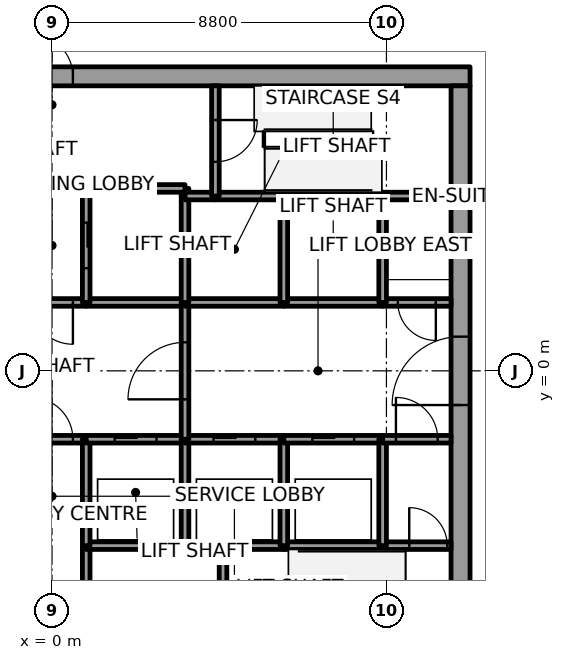
"""IFC4 building model, lengths in metres.
Left out: names, types, materials, properties, quantities, classifications, styles, units other than length and angle.
Written with IfcOpenShell. Run it as: python <this file> out.ifc"""

import sys

from ifc_helpers import new_model, si_unit, direction, frame, frame_2d, origin, place, context, subcontext, project, spatial, rectangle, extrude, element, fill, save


model = new_model("IFC4")
c1 = context("Model", 3, precision=1e-05, world=origin(), true_north=direction((0.0, 1.0)))
c2 = subcontext(c1, "Body", "Model", "MODEL_VIEW")
j1 = project(units=[si_unit("LENGTHUNIT", "METRE"), si_unit("PLANEANGLEUNIT", "RADIAN")], contexts=[c1])
p1 = place(None, origin())
s1 = spatial("IfcSite", under=j1, at=p1, CompositionType="ELEMENT")
p2 = place(p1, origin())
s2 = spatial("IfcBuilding", under=s1, at=p2, CompositionType="ELEMENT")
p3 = place(p2, frame((0.0, 0.0, 103.5)))
s3 = spatial("IfcBuildingStorey", under=s2, at=p3, CompositionType="ELEMENT", Elevation=103.5)
p4 = place(p3, frame((-11.0, 7.75, 0.0), z_axis=(0.0, 0.0, 1.0), x_axis=(1.0, 0.0, 0.0)))
e1 = element("IfcWall", 1, at=p4, inside=s3, PredefinedType="SHEAR", context=c2, shape_type="SweptSolid", body=[
    extrude(rectangle(XDim=22.0, YDim=0.5, at=frame_2d((11.0, 0.0))), origin(), (0.0, 0.0, 1.0), 3.7),
])
p5 = place(p4, frame((10.45, 0.0, 0.0)))
e2 = element("IfcOpeningElement", 2, at=p5, cuts=e1, PredefinedType="OPENING", context=c2, shape_type="SweptSolid", body=[
    extrude(rectangle(XDim=1.1, YDim=2.1, at=frame_2d((0.55, 1.05))), frame((0.0, 0.25, 0.0), z_axis=(0.0, -1.0, 0.0), x_axis=(1.0, 0.0, 0.0)), (0.0, 0.0, 1.0), 0.5),
])
p6 = place(p3, frame((10.75, -7.5, 0.0), z_axis=(0.0, 0.0, 1.0), x_axis=(0.0, 1.0, 0.0)))
e3 = element("IfcWall", 3, at=p6, inside=s3, PredefinedType="SHEAR", context=c2, shape_type="SweptSolid", body=[
    extrude(rectangle(XDim=15.0, YDim=0.5, at=frame_2d((7.5, 0.0))), origin(), (0.0, 0.0, 1.0), 3.7),
])
p7 = place(p6, frame((6.6, 0.0, 0.0)))
e4 = element("IfcOpeningElement", 4, at=p7, cuts=e3, PredefinedType="OPENING", context=c2, shape_type="SweptSolid", body=[
    extrude(rectangle(XDim=1.8, YDim=2.1, at=frame_2d((0.9, 1.05))), frame((0.0, 0.25, 0.0), z_axis=(0.0, -1.0, 0.0), x_axis=(1.0, 0.0, 0.0)), (0.0, 0.0, 1.0), 0.5),
])
p8 = place(p3, frame((-0.9, -1.8, 0.0), z_axis=(0.0, 0.0, 1.0), x_axis=(1.0, 0.0, 0.0)))
e5 = element("IfcWall", 5, at=p8, inside=s3, PredefinedType="SOLIDWALL", context=c2, shape_type="SweptSolid", body=[
    extrude(rectangle(XDim=1.8, YDim=0.2, at=frame_2d((0.9, 0.0))), origin(), (0.0, 0.0, 1.0), 3.55),
])
p9 = place(p8, frame((0.35, 0.0, 0.0)))
e6 = element("IfcOpeningElement", 6, at=p9, cuts=e5, PredefinedType="OPENING", context=c2, shape_type="SweptSolid", body=[
    extrude(rectangle(XDim=1.1, YDim=2.1, at=frame_2d((0.55, 1.05))), frame((0.0, 0.1, 0.0), z_axis=(0.0, -1.0, 0.0), x_axis=(1.0, 0.0, 0.0)), (0.0, 0.0, 1.0), 0.2),
])
p10 = place(p3, frame((0.9, 1.8, 0.0), z_axis=(0.0, 0.0, 1.0), x_axis=(-1.0, 0.0, 0.0)))
e7 = element("IfcWall", 7, at=p10, inside=s3, PredefinedType="SOLIDWALL", context=c2, shape_type="SweptSolid", body=[
    extrude(rectangle(XDim=1.8, YDim=0.2, at=frame_2d((0.9, 0.0))), origin(), (0.0, 0.0, 1.0), 3.55),
])
p11 = place(p10, frame((0.35, 0.0, 0.0)))
e8 = element("IfcOpeningElement", 8, at=p11, cuts=e7, PredefinedType="OPENING", context=c2, shape_type="SweptSolid", body=[
    extrude(rectangle(XDim=1.1, YDim=2.1, at=frame_2d((0.55, 1.05))), frame((0.0, 0.1, 0.0), z_axis=(0.0, -1.0, 0.0), x_axis=(1.0, 0.0, 0.0)), (0.0, 0.0, 1.0), 0.2),
])
p12 = place(p3, frame((0.9, -4.6, 0.0), z_axis=(0.0, 0.0, 1.0), x_axis=(0.0, -1.0, 0.0)))
e9 = element("IfcWall", 9, at=p12, inside=s3, PredefinedType="SOLIDWALL", context=c2, shape_type="SweptSolid", body=[
    extrude(rectangle(XDim=2.9, YDim=0.2, at=frame_2d((1.45, 0.0))), origin(), (0.0, 0.0, 1.0), 3.55),
])
p13 = place(p12, frame((1.0, 0.0, 0.0)))
e10 = element("IfcOpeningElement", 10, at=p13, cuts=e9, PredefinedType="OPENING", context=c2, shape_type="SweptSolid", body=[
    extrude(rectangle(XDim=0.9, YDim=2.1, at=frame_2d((0.45, 1.05))), frame((0.0, 0.1, 0.0), z_axis=(0.0, -1.0, 0.0), x_axis=(1.0, 0.0, 0.0)), (0.0, 0.0, 1.0), 0.2),
])
p14 = place(p3, frame((3.5, -4.6, 0.0), z_axis=(0.0, 0.0, 1.0), x_axis=(-1.0, 0.0, 0.0)))
e11 = element("IfcWall", 11, at=p14, inside=s3, PredefinedType="SOLIDWALL", context=c2, shape_type="SweptSolid", body=[
    extrude(rectangle(XDim=2.6, YDim=0.2, at=frame_2d((1.3, 0.0))), origin(), (0.0, 0.0, 1.0), 3.55),
])
p15 = place(p3, frame((0.9, -1.8, 0.0), z_axis=(0.0, 0.0, 1.0), x_axis=(0.0, -1.0, 0.0)))
e12 = element("IfcWall", 12, at=p15, inside=s3, PredefinedType="SOLIDWALL", context=c2, shape_type="SweptSolid", body=[
    extrude(rectangle(XDim=2.8, YDim=0.2, at=frame_2d((1.4, 0.0))), origin(), (0.0, 0.0, 1.0), 3.55),
])
p16 = place(p3, frame((0.9, -1.8, 0.0), z_axis=(0.0, 0.0, 1.0), x_axis=(1.0, 0.0, 0.0)))
e13 = element("IfcWall", 13, at=p16, inside=s3, PredefinedType="SOLIDWALL", context=c2, shape_type="SweptSolid", body=[
    extrude(rectangle(XDim=2.6, YDim=0.2, at=frame_2d((1.3, 0.0))), origin(), (0.0, 0.0, 1.0), 3.55),
])
p17 = place(p16, frame((0.75, 0.0, 0.0)))
e14 = element("IfcOpeningElement", 14, at=p17, cuts=e13, PredefinedType="OPENING", context=c2, shape_type="SweptSolid", body=[
    extrude(rectangle(XDim=1.1, YDim=2.1, at=frame_2d((0.55, 1.05))), frame((0.0, 0.1, 0.0), z_axis=(0.0, -1.0, 0.0), x_axis=(1.0, 0.0, 0.0)), (0.0, 0.0, 1.0), 0.2),
])
p18 = place(p3, frame((3.5, 1.8, 0.0), z_axis=(0.0, 0.0, 1.0), x_axis=(-1.0, 0.0, 0.0)))
e15 = element("IfcWall", 15, at=p18, inside=s3, PredefinedType="SOLIDWALL", context=c2, shape_type="SweptSolid", body=[
    extrude(rectangle(XDim=2.6, YDim=0.2, at=frame_2d((1.3, 0.0))), origin(), (0.0, 0.0, 1.0), 3.55),
])
p19 = place(p3, frame((3.5, 4.6, 0.0), z_axis=(0.0, 0.0, 1.0), x_axis=(0.0, 1.0, 0.0)))
e16 = element("IfcWall", 16, at=p19, inside=s3, PredefinedType="SOLIDWALL", context=c2, shape_type="SweptSolid", body=[
    extrude(rectangle(XDim=0.2, YDim=0.2, at=frame_2d((0.1, 0.0))), origin(), (0.0, 0.0, 1.0), 3.55),
])
p20 = place(p3, frame((3.5, 4.8, 0.0), z_axis=(0.0, 0.0, 1.0), x_axis=(-1.0, 0.0, 0.0)))
e17 = element("IfcWall", 17, at=p20, inside=s3, PredefinedType="SOLIDWALL", context=c2, shape_type="SweptSolid", body=[
    extrude(rectangle(XDim=2.6, YDim=0.2, at=frame_2d((1.3, 0.0))), origin(), (0.0, 0.0, 1.0), 3.55),
])
p21 = place(p3, frame((0.9, 4.8, 0.0), z_axis=(0.0, 0.0, 1.0), x_axis=(0.0, -1.0, 0.0)))
e18 = element("IfcWall", 18, at=p21, inside=s3, PredefinedType="SOLIDWALL", context=c2, shape_type="SweptSolid", body=[
    extrude(rectangle(XDim=3.0, YDim=0.2, at=frame_2d((1.5, 0.0))), origin(), (0.0, 0.0, 1.0), 3.55),
])
p22 = place(p21, frame((0.9, 0.0, 0.0)))
e19 = element("IfcOpeningElement", 19, at=p22, cuts=e18, PredefinedType="OPENING", context=c2, shape_type="SweptSolid", body=[
    extrude(rectangle(XDim=1.2, YDim=2.1, at=frame_2d((0.6, 1.05))), frame((0.0, 0.1, 0.0), z_axis=(0.0, -1.0, 0.0), x_axis=(1.0, 0.0, 0.0)), (0.0, 0.0, 1.0), 0.2),
])
p23 = place(p3, frame((4.5, -4.6, 0.0), z_axis=(0.0, 0.0, 1.0), x_axis=(-1.0, 0.0, 0.0)))
e20 = element("IfcWall", 20, at=p23, inside=s3, PredefinedType="SOLIDWALL", context=c2, shape_type="SweptSolid", body=[
    extrude(rectangle(XDim=1.0, YDim=0.2, at=frame_2d((0.5, 0.0))), origin(), (0.0, 0.0, 1.0), 3.55),
])
p24 = place(p3, frame((3.5, -4.6, 0.0), z_axis=(0.0, 0.0, 1.0), x_axis=(0.0, 1.0, 0.0)))
e21 = element("IfcWall", 21, at=p24, inside=s3, PredefinedType="SOLIDWALL", context=c2, shape_type="SweptSolid", body=[
    extrude(rectangle(XDim=2.8, YDim=0.2, at=frame_2d((1.4, 0.0))), origin(), (0.0, 0.0, 1.0), 3.55),
])
p25 = place(p3, frame((3.5, -1.8, 0.0), z_axis=(0.0, 0.0, 1.0), x_axis=(1.0, 0.0, 0.0)))
e22 = element("IfcWall", 22, at=p25, inside=s3, PredefinedType="SOLIDWALL", context=c2, shape_type="SweptSolid", body=[
    extrude(rectangle(XDim=2.6, YDim=0.2, at=frame_2d((1.3, 0.0))), origin(), (0.0, 0.0, 1.0), 3.55),
])
p26 = place(p25, frame((0.75, 0.0, 0.0)))
e23 = element("IfcOpeningElement", 23, at=p26, cuts=e22, PredefinedType="OPENING", context=c2, shape_type="SweptSolid", body=[
    extrude(rectangle(XDim=1.1, YDim=2.1, at=frame_2d((0.55, 1.05))), frame((0.0, 0.1, 0.0), z_axis=(0.0, -1.0, 0.0), x_axis=(1.0, 0.0, 0.0)), (0.0, 0.0, 1.0), 0.2),
])
p27 = place(p3, frame((3.5, -1.8, 0.0), z_axis=(0.0, 0.0, 1.0), x_axis=(0.0, 1.0, 0.0)))
e24 = element("IfcWall", 24, at=p27, inside=s3, PredefinedType="SOLIDWALL", context=c2, shape_type="SweptSolid", body=[
    extrude(rectangle(XDim=3.6, YDim=0.2, at=frame_2d((1.8, 0.0))), origin(), (0.0, 0.0, 1.0), 3.55),
])
p28 = place(p27, frame((1.05, 0.0, 0.0)))
e25 = element("IfcOpeningElement", 25, at=p28, cuts=e24, PredefinedType="OPENING", context=c2, shape_type="SweptSolid", body=[
    extrude(rectangle(XDim=1.5, YDim=2.1, at=frame_2d((0.75, 1.05))), frame((0.0, 0.1, 0.0), z_axis=(0.0, -1.0, 0.0), x_axis=(1.0, 0.0, 0.0)), (0.0, 0.0, 1.0), 0.2),
])
p29 = place(p3, frame((6.1, 1.8, 0.0), z_axis=(0.0, 0.0, 1.0), x_axis=(-1.0, 0.0, 0.0)))
e26 = element("IfcWall", 26, at=p29, inside=s3, PredefinedType="SOLIDWALL", context=c2, shape_type="SweptSolid", body=[
    extrude(rectangle(XDim=2.6, YDim=0.2, at=frame_2d((1.3, 0.0))), origin(), (0.0, 0.0, 1.0), 3.55),
])
p30 = place(p3, frame((3.5, 1.8, 0.0), z_axis=(0.0, 0.0, 1.0), x_axis=(0.0, 1.0, 0.0)))
e27 = element("IfcWall", 27, at=p30, inside=s3, PredefinedType="SOLIDWALL", context=c2, shape_type="SweptSolid", body=[
    extrude(rectangle(XDim=2.8, YDim=0.2, at=frame_2d((1.4, 0.0))), origin(), (0.0, 0.0, 1.0), 3.55),
])
p31 = place(p3, frame((4.3, 4.6, 0.0), z_axis=(0.0, 0.0, 1.0), x_axis=(-1.0, 0.0, 0.0)))
e28 = element("IfcWall", 28, at=p31, inside=s3, PredefinedType="SOLIDWALL", context=c2, shape_type="SweptSolid", body=[
    extrude(rectangle(XDim=0.8, YDim=0.2, at=frame_2d((0.4, 0.0))), origin(), (0.0, 0.0, 1.0), 3.55),
])
p32 = place(p3, frame((6.1, 4.6, 0.0), z_axis=(0.0, 0.0, 1.0), x_axis=(-1.0, 0.0, 0.0)))
e29 = element("IfcWall", 29, at=p32, inside=s3, PredefinedType="SOLIDWALL", context=c2, shape_type="SweptSolid", body=[
    extrude(rectangle(XDim=1.8, YDim=0.2, at=frame_2d((0.9, 0.0))), origin(), (0.0, 0.0, 1.0), 3.55),
])
p33 = place(p3, frame((4.3, 7.5, 0.0), z_axis=(0.0, 0.0, 1.0), x_axis=(0.0, -1.0, 0.0)))
e30 = element("IfcWall", 30, at=p33, inside=s3, PredefinedType="SOLIDWALL", context=c2, shape_type="SweptSolid", body=[
    extrude(rectangle(XDim=2.9, YDim=0.2, at=frame_2d((1.45, 0.0))), origin(), (0.0, 0.0, 1.0), 3.55),
])
p34 = place(p33, frame((0.9, 0.0, 0.0)))
e31 = element("IfcOpeningElement", 31, at=p34, cuts=e30, PredefinedType="OPENING", context=c2, shape_type="SweptSolid", body=[
    extrude(rectangle(XDim=1.1, YDim=2.1, at=frame_2d((0.55, 1.05))), frame((0.0, 0.1, 0.0), z_axis=(0.0, -1.0, 0.0), x_axis=(1.0, 0.0, 0.0)), (0.0, 0.0, 1.0), 0.2),
])
p35 = place(p3, frame((4.5, -7.5, 0.0), z_axis=(0.0, 0.0, 1.0), x_axis=(0.0, 1.0, 0.0)))
e32 = element("IfcWall", 32, at=p35, inside=s3, PredefinedType="SOLIDWALL", context=c2, shape_type="SweptSolid", body=[
    extrude(rectangle(XDim=2.9, YDim=0.2, at=frame_2d((1.45, 0.0))), origin(), (0.0, 0.0, 1.0), 3.55),
])
p36 = place(p3, frame((4.5, -4.6, 0.0), z_axis=(0.0, 0.0, 1.0), x_axis=(1.0, 0.0, 0.0)))
e33 = element("IfcWall", 33, at=p36, inside=s3, PredefinedType="SOLIDWALL", context=c2, shape_type="SweptSolid", body=[
    extrude(rectangle(XDim=1.6, YDim=0.2, at=frame_2d((0.8, 0.0))), origin(), (0.0, 0.0, 1.0), 3.55),
])
p37 = place(p3, frame((6.1, -4.6, 0.0), z_axis=(0.0, 0.0, 1.0), x_axis=(1.0, 0.0, 0.0)))
e34 = element("IfcWall", 34, at=p37, inside=s3, PredefinedType="SOLIDWALL", context=c2, shape_type="SweptSolid", body=[
    extrude(rectangle(XDim=2.6, YDim=0.2, at=frame_2d((1.3, 0.0))), origin(), (0.0, 0.0, 1.0), 3.55),
])
p38 = place(p3, frame((6.1, -4.6, 0.0), z_axis=(0.0, 0.0, 1.0), x_axis=(0.0, 1.0, 0.0)))
e35 = element("IfcWall", 35, at=p38, inside=s3, PredefinedType="SOLIDWALL", context=c2, shape_type="SweptSolid", body=[
    extrude(rectangle(XDim=2.8, YDim=0.2, at=frame_2d((1.4, 0.0))), origin(), (0.0, 0.0, 1.0), 3.55),
])
p39 = place(p3, frame((6.1, -1.8, 0.0), z_axis=(0.0, 0.0, 1.0), x_axis=(1.0, 0.0, 0.0)))
e36 = element("IfcWall", 36, at=p39, inside=s3, PredefinedType="SOLIDWALL", context=c2, shape_type="SweptSolid", body=[
    extrude(rectangle(XDim=2.6, YDim=0.2, at=frame_2d((1.3, 0.0))), origin(), (0.0, 0.0, 1.0), 3.55),
])
p40 = place(p39, frame((0.75, 0.0, 0.0)))
e37 = element("IfcOpeningElement", 37, at=p40, cuts=e36, PredefinedType="OPENING", context=c2, shape_type="SweptSolid", body=[
    extrude(rectangle(XDim=1.1, YDim=2.1, at=frame_2d((0.55, 1.05))), frame((0.0, 0.1, 0.0), z_axis=(0.0, -1.0, 0.0), x_axis=(1.0, 0.0, 0.0)), (0.0, 0.0, 1.0), 0.2),
])
p41 = place(p3, frame((8.7, 1.8, 0.0), z_axis=(0.0, 0.0, 1.0), x_axis=(-1.0, 0.0, 0.0)))
e38 = element("IfcWall", 38, at=p41, inside=s3, PredefinedType="SOLIDWALL", context=c2, shape_type="SweptSolid", body=[
    extrude(rectangle(XDim=2.6, YDim=0.2, at=frame_2d((1.3, 0.0))), origin(), (0.0, 0.0, 1.0), 3.55),
])
p42 = place(p3, frame((6.1, 1.8, 0.0), z_axis=(0.0, 0.0, 1.0), x_axis=(0.0, 1.0, 0.0)))
e39 = element("IfcWall", 39, at=p42, inside=s3, PredefinedType="SOLIDWALL", context=c2, shape_type="SweptSolid", body=[
    extrude(rectangle(XDim=2.8, YDim=0.2, at=frame_2d((1.4, 0.0))), origin(), (0.0, 0.0, 1.0), 3.55),
])
p43 = place(p3, frame((8.7, 4.6, 0.0), z_axis=(0.0, 0.0, 1.0), x_axis=(-1.0, 0.0, 0.0)))
e40 = element("IfcWall", 40, at=p43, inside=s3, PredefinedType="SOLIDWALL", context=c2, shape_type="SweptSolid", body=[
    extrude(rectangle(XDim=2.6, YDim=0.2, at=frame_2d((1.3, 0.0))), origin(), (0.0, 0.0, 1.0), 3.55),
])
p44 = place(p3, frame((8.7, -4.6, 0.0), z_axis=(0.0, 0.0, 1.0), x_axis=(1.0, 0.0, 0.0)))
e41 = element("IfcWall", 41, at=p44, inside=s3, PredefinedType="SOLIDWALL", context=c2, shape_type="SweptSolid", body=[
    extrude(rectangle(XDim=1.8, YDim=0.2, at=frame_2d((0.9, 0.0))), origin(), (0.0, 0.0, 1.0), 3.55),
])
p45 = place(p44, frame((0.7, 0.0, 0.0)))
e42 = element("IfcOpeningElement", 42, at=p45, cuts=e41, PredefinedType="OPENING", context=c2, shape_type="SweptSolid", body=[
    extrude(rectangle(XDim=1.0, YDim=2.1, at=frame_2d((0.5, 1.05))), frame((0.0, 0.1, 0.0), z_axis=(0.0, -1.0, 0.0), x_axis=(1.0, 0.0, 0.0)), (0.0, 0.0, 1.0), 0.2),
])
p46 = place(p3, frame((8.7, -1.8, 0.0), z_axis=(0.0, 0.0, 1.0), x_axis=(0.0, -1.0, 0.0)))
e43 = element("IfcWall", 43, at=p46, inside=s3, PredefinedType="SOLIDWALL", context=c2, shape_type="SweptSolid", body=[
    extrude(rectangle(XDim=2.8, YDim=0.2, at=frame_2d((1.4, 0.0))), origin(), (0.0, 0.0, 1.0), 3.55),
])
p47 = place(p3, frame((8.7, -1.8, 0.0), z_axis=(0.0, 0.0, 1.0), x_axis=(1.0, 0.0, 0.0)))
e44 = element("IfcWall", 44, at=p47, inside=s3, PredefinedType="SOLIDWALL", context=c2, shape_type="SweptSolid", body=[
    extrude(rectangle(XDim=1.8, YDim=0.2, at=frame_2d((0.9, 0.0))), origin(), (0.0, 0.0, 1.0), 3.55),
])
p48 = place(p47, frame((0.35, 0.0, 0.0)))
e45 = element("IfcOpeningElement", 45, at=p48, cuts=e44, PredefinedType="OPENING", context=c2, shape_type="SweptSolid", body=[
    extrude(rectangle(XDim=1.1, YDim=2.1, at=frame_2d((0.55, 1.05))), frame((0.0, 0.1, 0.0), z_axis=(0.0, -1.0, 0.0), x_axis=(1.0, 0.0, 0.0)), (0.0, 0.0, 1.0), 0.2),
])
p49 = place(p3, frame((10.5, 1.8, 0.0), z_axis=(0.0, 0.0, 1.0), x_axis=(-1.0, 0.0, 0.0)))
e46 = element("IfcWall", 46, at=p49, inside=s3, PredefinedType="SOLIDWALL", context=c2, shape_type="SweptSolid", body=[
    extrude(rectangle(XDim=1.8, YDim=0.2, at=frame_2d((0.9, 0.0))), origin(), (0.0, 0.0, 1.0), 3.55),
])
p50 = place(p49, frame((0.4, 0.0, 0.0)))
e47 = element("IfcOpeningElement", 47, at=p50, cuts=e46, PredefinedType="OPENING", context=c2, shape_type="SweptSolid", body=[
    extrude(rectangle(XDim=1.0, YDim=2.1, at=frame_2d((0.5, 1.05))), frame((0.0, 0.1, 0.0), z_axis=(0.0, -1.0, 0.0), x_axis=(1.0, 0.0, 0.0)), (0.0, 0.0, 1.0), 0.2),
])
p51 = place(p3, frame((8.7, 4.6, 0.0), z_axis=(0.0, 0.0, 1.0), x_axis=(0.0, -1.0, 0.0)))
e48 = element("IfcWall", 48, at=p51, inside=s3, PredefinedType="SOLIDWALL", context=c2, shape_type="SweptSolid", body=[
    extrude(rectangle(XDim=2.8, YDim=0.2, at=frame_2d((1.4, 0.0))), origin(), (0.0, 0.0, 1.0), 3.55),
])
p52 = place(p3, frame((10.5, 4.6, 0.0), z_axis=(0.0, 0.0, 1.0), x_axis=(-1.0, 0.0, 0.0)))
e49 = element("IfcWall", 49, at=p52, inside=s3, PredefinedType="SOLIDWALL", context=c2, shape_type="SweptSolid", body=[
    extrude(rectangle(XDim=1.8, YDim=0.2, at=frame_2d((0.9, 0.0))), origin(), (0.0, 0.0, 1.0), 3.55),
])
p53 = place(p17, origin())
e50 = element("IfcDoor", 50, at=p53, inside=s3, OperationType="SLIDING_TO_RIGHT", PredefinedType="DOOR", context=c2, shape_type="SweptSolid", body=[
    extrude(rectangle(XDim=1.1, YDim=2.1, at=frame_2d((0.55, 1.05))), frame((0.0, 0.025, 0.0), z_axis=(0.0, -1.0, 0.0), x_axis=(1.0, 0.0, 0.0)), (0.0, 0.0, 1.0), 0.05),
])
fill(e14, e50)
p54 = place(p26, origin())
e51 = element("IfcDoor", 51, at=p54, inside=s3, OperationType="SLIDING_TO_LEFT", PredefinedType="DOOR", context=c2, shape_type="SweptSolid", body=[
    extrude(rectangle(XDim=1.1, YDim=2.1, at=frame_2d((0.55, 1.05))), frame((0.0, 0.025, 0.0), z_axis=(0.0, -1.0, 0.0), x_axis=(1.0, 0.0, 0.0)), (0.0, 0.0, 1.0), 0.05),
])
fill(e23, e51)
p55 = place(p40, origin())
e52 = element("IfcDoor", 52, at=p55, inside=s3, OperationType="SLIDING_TO_RIGHT", PredefinedType="DOOR", context=c2, shape_type="SweptSolid", body=[
    extrude(rectangle(XDim=1.1, YDim=2.1, at=frame_2d((0.55, 1.05))), frame((0.0, 0.025, 0.0), z_axis=(0.0, -1.0, 0.0), x_axis=(1.0, 0.0, 0.0)), (0.0, 0.0, 1.0), 0.05),
])
fill(e37, e52)
p56 = place(p22, origin())
e53 = element("IfcDoor", 53, at=p56, inside=s3, OperationType="SLIDING_TO_RIGHT", PredefinedType="DOOR", context=c2, shape_type="SweptSolid", body=[
    extrude(rectangle(XDim=1.2, YDim=2.1, at=frame_2d((0.6, 1.05))), frame((0.0, 0.025, 0.0), z_axis=(0.0, -1.0, 0.0), x_axis=(1.0, 0.0, 0.0)), (0.0, 0.0, 1.0), 0.05),
])
fill(e19, e53)
p57 = place(p28, origin())
e54 = element("IfcDoor", 54, at=p57, inside=s3, OperationType="DOUBLE_DOOR_SINGLE_SWING", PredefinedType="DOOR", context=c2, shape_type="SweptSolid", body=[
    extrude(rectangle(XDim=1.5, YDim=2.1, at=frame_2d((0.75, 1.05))), frame((0.0, 0.025, 0.0), z_axis=(0.0, -1.0, 0.0), x_axis=(1.0, 0.0, 0.0)), (0.0, 0.0, 1.0), 0.05),
])
fill(e25, e54)
p58 = place(p48, origin())
e55 = element("IfcDoor", 55, at=p58, inside=s3, OperationType="SINGLE_SWING_RIGHT", PredefinedType="DOOR", context=c2, shape_type="SweptSolid", body=[
    extrude(rectangle(XDim=1.1, YDim=2.1, at=frame_2d((0.55, 1.05))), frame((0.0, 0.025, 0.0), z_axis=(0.0, -1.0, 0.0), x_axis=(1.0, 0.0, 0.0)), (0.0, 0.0, 1.0), 0.05),
])
fill(e45, e55)
p59 = place(p11, origin())
e56 = element("IfcDoor", 56, at=p59, inside=s3, OperationType="SINGLE_SWING_LEFT", PredefinedType="DOOR", context=c2, shape_type="SweptSolid", body=[
    extrude(rectangle(XDim=1.1, YDim=2.1, at=frame_2d((0.55, 1.05))), frame((0.0, 0.025, 0.0), z_axis=(0.0, -1.0, 0.0), x_axis=(1.0, 0.0, 0.0)), (0.0, 0.0, 1.0), 0.05),
])
fill(e8, e56)
p60 = place(p9, origin())
e57 = element("IfcDoor", 57, at=p60, inside=s3, OperationType="SINGLE_SWING_RIGHT", PredefinedType="DOOR", context=c2, shape_type="SweptSolid", body=[
    extrude(rectangle(XDim=1.1, YDim=2.1, at=frame_2d((0.55, 1.05))), frame((0.0, 0.025, 0.0), z_axis=(0.0, -1.0, 0.0), x_axis=(1.0, 0.0, 0.0)), (0.0, 0.0, 1.0), 0.05),
])
fill(e6, e57)
p61 = place(p50, origin())
e58 = element("IfcDoor", 58, at=p61, inside=s3, OperationType="SINGLE_SWING_LEFT", PredefinedType="DOOR", context=c2, shape_type="SweptSolid", body=[
    extrude(rectangle(XDim=1.0, YDim=2.1, at=frame_2d((0.5, 1.05))), frame((0.0, 0.025, 0.0), z_axis=(0.0, -1.0, 0.0), x_axis=(1.0, 0.0, 0.0)), (0.0, 0.0, 1.0), 0.05),
])
fill(e47, e58)
p62 = place(p45, origin())
e59 = element("IfcDoor", 59, at=p62, inside=s3, OperationType="SINGLE_SWING_RIGHT", PredefinedType="DOOR", context=c2, shape_type="SweptSolid", body=[
    extrude(rectangle(XDim=1.0, YDim=2.1, at=frame_2d((0.5, 1.05))), frame((0.0, 0.025, 0.0), z_axis=(0.0, -1.0, 0.0), x_axis=(1.0, 0.0, 0.0)), (0.0, 0.0, 1.0), 0.05),
])
fill(e42, e59)
p63 = place(p34, origin())
e60 = element("IfcDoor", 60, at=p63, inside=s3, OperationType="SINGLE_SWING_LEFT", PredefinedType="DOOR", context=c2, shape_type="SweptSolid", body=[
    extrude(rectangle(XDim=1.1, YDim=2.1, at=frame_2d((0.55, 1.05))), frame((0.0, 0.025, 0.0), z_axis=(0.0, -1.0, 0.0), x_axis=(1.0, 0.0, 0.0)), (0.0, 0.0, 1.0), 0.05),
])
fill(e31, e60)
p64 = place(p7, origin())
e61 = element("IfcDoor", 61, at=p64, inside=s3, OperationType="DOUBLE_DOOR_SINGLE_SWING", PredefinedType="DOOR", context=c2, shape_type="SweptSolid", body=[
    extrude(rectangle(XDim=1.8, YDim=2.1, at=frame_2d((0.9, 1.05))), frame((0.0, 0.025, 0.0), z_axis=(0.0, -1.0, 0.0), x_axis=(1.0, 0.0, 0.0)), (0.0, 0.0, 1.0), 0.05),
])
fill(e4, e61)
p65 = place(p5, origin())
e62 = element("IfcDoor", 62, at=p65, inside=s3, OperationType="SINGLE_SWING_RIGHT", PredefinedType="DOOR", context=c2, shape_type="SweptSolid", body=[
    extrude(rectangle(XDim=1.1, YDim=2.1, at=frame_2d((0.55, 1.05))), frame((0.0, 0.025, 0.0), z_axis=(0.0, -1.0, 0.0), x_axis=(1.0, 0.0, 0.0)), (0.0, 0.0, 1.0), 0.05),
])
fill(e2, e62)
save(model, sys.argv[1])
